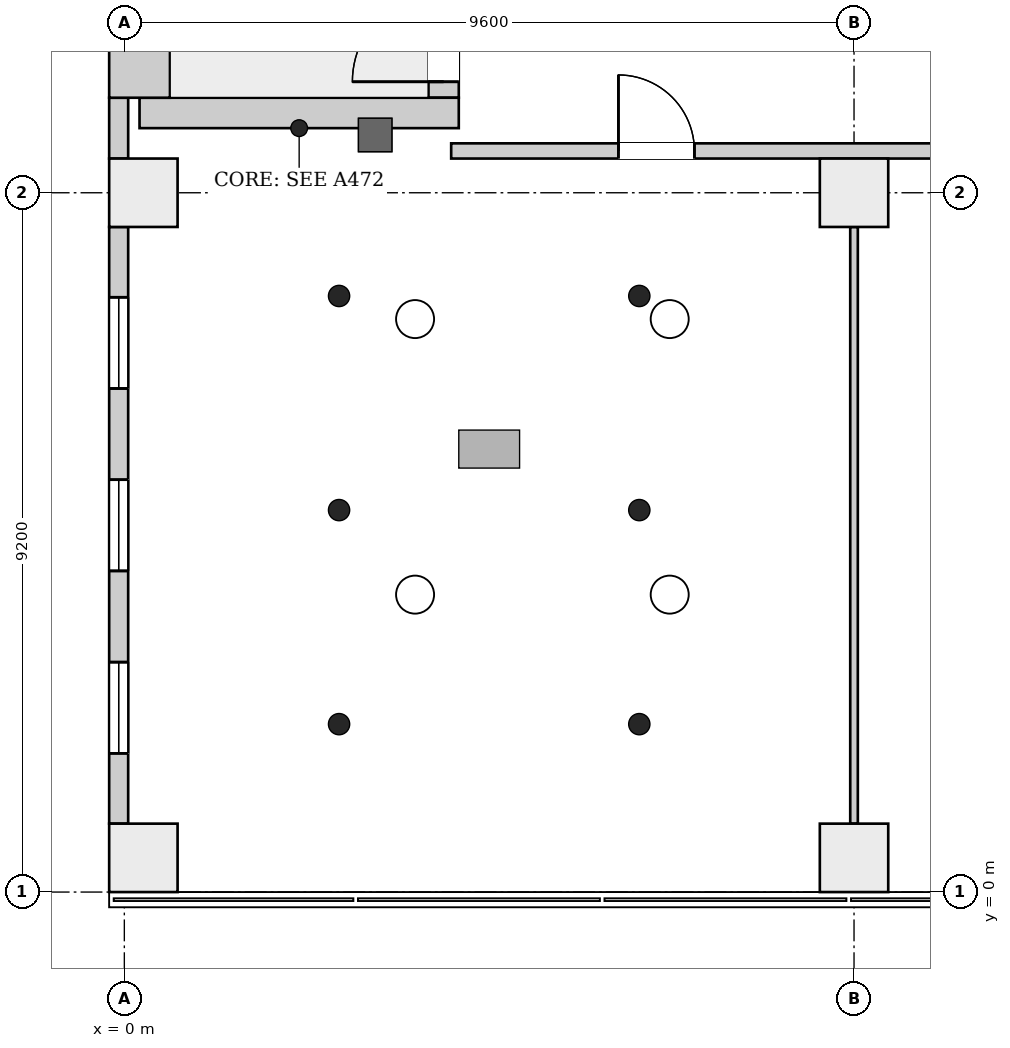
"""IFC4 building model, lengths in metres.
Left out: names, types, materials, properties, quantities, classifications, styles, units other than length and angle.
Written with IfcOpenShell. Run it as: python <this file> out.ifc"""

import sys

from ifc_helpers import new_model, si_unit, direction, frame, frame_2d, origin, origin_2d, place, context, subcontext, project, spatial, rectangle, extrude, element, fill, save


model = new_model("IFC4")
c1 = context("Model", 3, precision=1e-05, world=origin(), true_north=direction((0.0, 1.0)))
c2 = subcontext(c1, "Body", "Model", "MODEL_VIEW")
j1 = project(units=[si_unit("LENGTHUNIT", "METRE"), si_unit("PLANEANGLEUNIT", "RADIAN")], contexts=[c1])
p1 = place(None, origin())
s1 = spatial("IfcSite", under=j1, at=p1, CompositionType="ELEMENT")
p2 = place(p1, origin())
s2 = spatial("IfcBuilding", under=s1, at=p2, CompositionType="ELEMENT")
p3 = place(p2, frame((0.0, 0.0, 44.5)))
s3 = spatial("IfcBuildingStorey", under=s2, at=p3, CompositionType="ELEMENT", Elevation=44.5)
p4 = place(p3, frame((0.2, 10.25, 0.0), z_axis=(0.0, 0.0, 1.0), x_axis=(1.0, 0.0, 0.0)))
e1 = element("IfcWall", 1, at=p4, inside=s3, PredefinedType="SHEAR", context=c2, shape_type="SweptSolid", body=[
    extrude(rectangle(XDim=4.2, YDim=0.4, at=frame_2d((2.1, 0.0))), origin(), (0.0, 0.0, 1.0), 4.2),
])
p5 = place(p3, frame((0.2, 10.45, 0.0), z_axis=(0.0, 0.0, 1.0), x_axis=(0.0, 1.0, 0.0)))
e2 = element("IfcWall", 2, at=p5, inside=s3, PredefinedType="SHEAR", context=c2, shape_type="SweptSolid", body=[
    extrude(rectangle(XDim=6.6, YDim=0.8, at=frame_2d((3.3, 0.0))), origin(), (0.0, 0.0, 1.0), 4.2),
])
p6 = place(p3, frame((4.2, 10.45, 0.0), z_axis=(0.0, 0.0, 1.0), x_axis=(0.0, 1.0, 0.0)))
e3 = element("IfcWall", 3, at=p6, inside=s3, PredefinedType="SHEAR", context=c2, shape_type="SweptSolid", body=[
    extrude(rectangle(XDim=6.6, YDim=0.4, at=frame_2d((3.3, 0.0))), origin(), (0.0, 0.0, 1.0), 4.2),
])
p7 = place(p6, frame((0.21, 0.0, 0.0)))
e4 = element("IfcOpeningElement", 4, at=p7, cuts=e3, PredefinedType="OPENING", context=c2, shape_type="SweptSolid", body=[
    extrude(rectangle(XDim=1.2, YDim=2.1, at=frame_2d((0.6, 1.05))), frame((0.0, 0.21, 0.0), z_axis=(0.0, -1.0, 0.0), x_axis=(1.0, 0.0, 0.0)), (0.0, 0.0, 1.0), 0.42),
])
for number, where, z_axis, x_axis in (
    (5, (0.25, 0.45, 0.0), (0.0, 0.0, 1.0), (1.0, 0.0, 0.0)),
    (6, (9.6, 0.45, 0.0), (0.0, 0.0, 1.0), (1.0, 0.0, 0.0)),
    (7, (0.25, 9.2, 0.0), (0.0, 0.0, 1.0), (1.0, 0.0, 0.0)),
    (8, (9.6, 9.2, 0.0), (0.0, 0.0, 1.0), (1.0, 0.0, 0.0)),
):
    element("IfcColumn", number, at=place(p3, frame(where, z_axis=z_axis, x_axis=x_axis)), inside=s3, PredefinedType="COLUMN", context=c2, shape_type="SweptSolid", body=[
        extrude(rectangle(XDim=0.9, YDim=0.9, at=origin_2d()), origin(), (0.0, 0.0, 1.0), 4.2),
    ])
p8 = place(p3, frame((-0.074, 8.75, 0.0), z_axis=(0.0, 0.0, 1.0), x_axis=(0.0, -1.0, 0.0)))
e9 = element("IfcWall", 9, at=p8, inside=s3, PredefinedType="ELEMENTEDWALL", context=c2, shape_type="SweptSolid", body=[
    extrude(rectangle(XDim=7.85, YDim=0.25, at=frame_2d((3.925, 0.0))), origin(), (0.0, 0.0, 1.0), 3.9),
])
p9 = place(p8, frame((5.725, 0.0, 0.9)))
e10 = element("IfcOpeningElement", 10, at=p9, cuts=e9, PredefinedType="OPENING", context=c2, shape_type="SweptSolid", body=[
    extrude(rectangle(XDim=1.2, YDim=2.6, at=frame_2d((0.6, 1.3))), frame((0.0, 0.135, 0.0), z_axis=(0.0, -1.0, 0.0), x_axis=(1.0, 0.0, 0.0)), (0.0, 0.0, 1.0), 0.27),
])
p10 = place(p8, frame((3.325, 0.0, 0.9)))
e11 = element("IfcOpeningElement", 11, at=p10, cuts=e9, PredefinedType="OPENING", context=c2, shape_type="SweptSolid", body=[
    extrude(rectangle(XDim=1.2, YDim=2.6, at=frame_2d((0.6, 1.3))), frame((0.0, 0.135, 0.0), z_axis=(0.0, -1.0, 0.0), x_axis=(1.0, 0.0, 0.0)), (0.0, 0.0, 1.0), 0.27),
])
p11 = place(p8, frame((0.925, 0.0, 0.9)))
e12 = element("IfcOpeningElement", 12, at=p11, cuts=e9, PredefinedType="OPENING", context=c2, shape_type="SweptSolid", body=[
    extrude(rectangle(XDim=1.2, YDim=2.6, at=frame_2d((0.6, 1.3))), frame((0.0, 0.135, 0.0), z_axis=(0.0, -1.0, 0.0), x_axis=(1.0, 0.0, 0.0)), (0.0, 0.0, 1.0), 0.27),
])
p12 = place(p3, frame((-0.074, 10.45, 0.0), z_axis=(0.0, 0.0, 1.0), x_axis=(0.0, -1.0, 0.0)))
e13 = element("IfcWall", 13, at=p12, inside=s3, PredefinedType="ELEMENTEDWALL", context=c2, shape_type="SweptSolid", body=[
    extrude(rectangle(XDim=0.8, YDim=0.25, at=frame_2d((0.4, 0.0))), origin(), (0.0, 0.0, 1.0), 3.9),
])
p13 = place(p3, frame((4.3, 9.75, 0.0), z_axis=(0.0, 0.0, 1.0), x_axis=(1.0, 0.0, 0.0)))
e14 = element("IfcWall", 14, at=p13, inside=s3, PredefinedType="PARTITIONING", context=c2, shape_type="SweptSolid", body=[
    extrude(rectangle(XDim=43.894, YDim=0.2, at=frame_2d((21.947, 0.0))), origin(), (0.0, 0.0, 1.0), 3.9),
])
p14 = place(p13, frame((2.2, 0.0, 0.0)))
e15 = element("IfcOpeningElement", 15, at=p14, cuts=e14, PredefinedType="OPENING", context=c2, shape_type="SweptSolid", body=[
    extrude(rectangle(XDim=1.0, YDim=2.1, at=frame_2d((0.5, 1.05))), frame((0.0, 0.11, 0.0), z_axis=(0.0, -1.0, 0.0), x_axis=(1.0, 0.0, 0.0)), (0.0, 0.0, 1.0), 0.22),
])
p15 = place(p13, frame((12.0, 0.0, 0.0)))
e16 = element("IfcOpeningElement", 16, at=p15, cuts=e14, PredefinedType="OPENING", context=c2, shape_type="SweptSolid", body=[
    extrude(rectangle(XDim=1.0, YDim=2.1, at=frame_2d((0.5, 1.05))), frame((0.0, 0.11, 0.0), z_axis=(0.0, -1.0, 0.0), x_axis=(1.0, 0.0, 0.0)), (0.0, 0.0, 1.0), 0.22),
])
p16 = place(p13, frame((21.6, 0.0, 0.0)))
e17 = element("IfcOpeningElement", 17, at=p16, cuts=e14, PredefinedType="OPENING", context=c2, shape_type="SweptSolid", body=[
    extrude(rectangle(XDim=1.0, YDim=2.1, at=frame_2d((0.5, 1.05))), frame((0.0, 0.11, 0.0), z_axis=(0.0, -1.0, 0.0), x_axis=(1.0, 0.0, 0.0)), (0.0, 0.0, 1.0), 0.22),
])
p17 = place(p13, frame((28.8, 0.0, 0.0)))
e18 = element("IfcOpeningElement", 18, at=p17, cuts=e14, PredefinedType="OPENING", context=c2, shape_type="SweptSolid", body=[
    extrude(rectangle(XDim=1.0, YDim=2.1, at=frame_2d((0.5, 1.05))), frame((0.0, 0.11, 0.0), z_axis=(0.0, -1.0, 0.0), x_axis=(1.0, 0.0, 0.0)), (0.0, 0.0, 1.0), 0.22),
])
p18 = place(p13, frame((38.25, 0.0, 0.0)))
e19 = element("IfcOpeningElement", 19, at=p18, cuts=e14, PredefinedType="OPENING", context=c2, shape_type="SweptSolid", body=[
    extrude(rectangle(XDim=1.5, YDim=2.1, at=frame_2d((0.75, 1.05))), frame((0.0, 0.11, 0.0), z_axis=(0.0, -1.0, 0.0), x_axis=(1.0, 0.0, 0.0)), (0.0, 0.0, 1.0), 0.22),
])
p19 = place(p3, frame((9.6, 0.9, 0.0), z_axis=(0.0, 0.0, 1.0), x_axis=(0.0, 1.0, 0.0)))
e20 = element("IfcWall", 20, at=p19, inside=s3, PredefinedType="PARTITIONING", context=c2, shape_type="SweptSolid", body=[
    extrude(rectangle(XDim=7.85, YDim=0.1, at=frame_2d((3.925, 0.0))), origin(), (0.0, 0.0, 1.0), 3.9),
])
p20 = place(p9, origin())
e21 = element("IfcWindow", 21, at=p20, inside=s3, PartitioningType="SINGLE_PANEL", PredefinedType="WINDOW", context=c2, shape_type="SweptSolid", body=[
    extrude(rectangle(XDim=1.2, YDim=2.6, at=frame_2d((0.6, 1.3))), frame((0.0, 0.03, 0.0), z_axis=(0.0, -1.0, 0.0), x_axis=(1.0, 0.0, 0.0)), (0.0, 0.0, 1.0), 0.06),
])
fill(e10, e21)
p21 = place(p10, origin())
e22 = element("IfcWindow", 22, at=p21, inside=s3, PartitioningType="SINGLE_PANEL", PredefinedType="WINDOW", context=c2, shape_type="SweptSolid", body=[
    extrude(rectangle(XDim=1.2, YDim=2.6, at=frame_2d((0.6, 1.3))), frame((0.0, 0.03, 0.0), z_axis=(0.0, -1.0, 0.0), x_axis=(1.0, 0.0, 0.0)), (0.0, 0.0, 1.0), 0.06),
])
fill(e11, e22)
p22 = place(p11, origin())
e23 = element("IfcWindow", 23, at=p22, inside=s3, PartitioningType="SINGLE_PANEL", PredefinedType="WINDOW", context=c2, shape_type="SweptSolid", body=[
    extrude(rectangle(XDim=1.2, YDim=2.6, at=frame_2d((0.6, 1.3))), frame((0.0, 0.03, 0.0), z_axis=(0.0, -1.0, 0.0), x_axis=(1.0, 0.0, 0.0)), (0.0, 0.0, 1.0), 0.06),
])
fill(e12, e23)
p23 = place(p7, origin())
e24 = element("IfcDoor", 24, at=p23, inside=s3, OperationType="SINGLE_SWING_RIGHT", PredefinedType="DOOR", context=c2, shape_type="SweptSolid", body=[
    extrude(rectangle(XDim=1.2, YDim=2.1, at=frame_2d((0.6, 1.05))), frame((0.0, 0.025, 0.0), z_axis=(0.0, -1.0, 0.0), x_axis=(1.0, 0.0, 0.0)), (0.0, 0.0, 1.0), 0.05),
])
fill(e4, e24)
p24 = place(p14, origin())
e25 = element("IfcDoor", 25, at=p24, inside=s3, OperationType="SINGLE_SWING_RIGHT", PredefinedType="DOOR", context=c2, shape_type="SweptSolid", body=[
    extrude(rectangle(XDim=1.0, YDim=2.1, at=frame_2d((0.5, 1.05))), frame((0.0, 0.025, 0.0), z_axis=(0.0, -1.0, 0.0), x_axis=(1.0, 0.0, 0.0)), (0.0, 0.0, 1.0), 0.05),
])
fill(e15, e25)
save(model, sys.argv[1])
